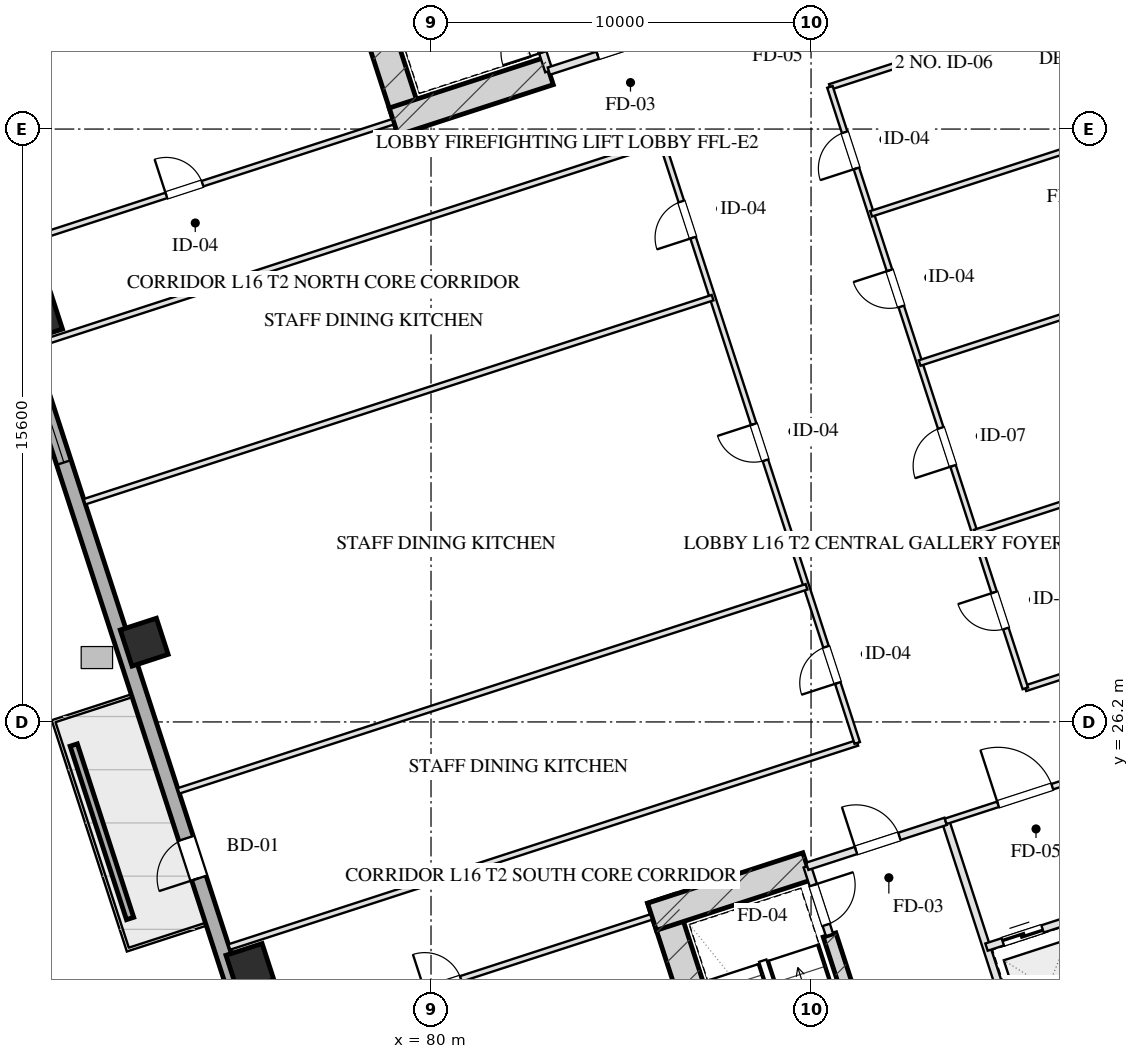
"""IFC4 building model, lengths in metres.
Left out: names, types, materials, properties, quantities, classifications, styles, units other than length and angle.
Written with IfcOpenShell. Run it as: python <this file> out.ifc"""

import sys

from ifc_helpers import new_model, si_unit, direction, frame, frame_2d, origin, origin_2d, place, context, subcontext, project, spatial, rectangle, hollow_rectangle, extrude, element, fill, save


model = new_model("IFC4")
c1 = context("Model", 3, precision=1e-05, world=origin(), true_north=direction((0.0, 1.0)))
c2 = subcontext(c1, "Body", "Model", "MODEL_VIEW")
j1 = project(units=[si_unit("LENGTHUNIT", "METRE"), si_unit("PLANEANGLEUNIT", "RADIAN")], contexts=[c1])
p1 = place(None, origin())
s1 = spatial("IfcSite", under=j1, at=p1, CompositionType="ELEMENT")
p2 = place(p1, origin())
s2 = spatial("IfcBuilding", under=s1, at=p2, CompositionType="ELEMENT")
p3 = place(p2, frame((0.0, 0.0, 67.85)))
s3 = spatial("IfcBuildingStorey", under=s2, at=p3, CompositionType="ELEMENT", Elevation=67.85)
p4 = place(p3, frame((86.055, 21.546, 0.0), z_axis=(0.0, 0.0, 1.0), x_axis=(0.309023585745, -0.951054374604, 0.0)))
e1 = element("IfcWall", 1, at=p4, inside=s3, PredefinedType="SHEAR", context=c2, shape_type="SweptSolid", body=[
    extrude(rectangle(XDim=9.63, YDim=0.75, at=frame_2d((4.815, 0.0))), origin(), (0.0, 0.0, 1.0), 3.45),
])
p5 = place(p3, frame((90.486, 20.594, 0.0), z_axis=(0.0, 0.0, 1.0), x_axis=(0.309020428229, -0.951055400562, 0.0)))
e2 = element("IfcWall", 2, at=p5, inside=s3, PredefinedType="SHEAR", context=c2, shape_type="SweptSolid", body=[
    extrude(rectangle(XDim=6.98, YDim=0.35, at=frame_2d((3.49, 0.0))), origin(), (0.0, 0.0, 1.0), 3.45),
])
p6 = place(p3, frame((85.814, 21.074, 0.0), z_axis=(0.0, 0.0, 1.0), x_axis=(0.95106580992, 0.308988390074, 0.0)))
e3 = element("IfcWall", 3, at=p6, inside=s3, PredefinedType="SHEAR", context=c2, shape_type="SweptSolid", body=[
    extrude(rectangle(XDim=4.295, YDim=0.75, at=frame_2d((2.147, 0.0))), origin(), (0.0, 0.0, 1.0), 3.45),
])
p7 = place(p3, frame((79.489, 41.756, 0.0), z_axis=(0.0, 0.0, 1.0), x_axis=(-0.309016134813, 0.951056795583, 0.0)))
e4 = element("IfcWall", 4, at=p7, inside=s3, PredefinedType="SHEAR", context=c2, shape_type="SweptSolid", body=[
    extrude(rectangle(XDim=9.63, YDim=0.75, at=frame_2d((4.815, 0.0))), origin(), (0.0, 0.0, 1.0), 3.45),
])
p8 = place(p3, frame((79.016, 41.997, 0.0), z_axis=(0.0, 0.0, 1.0), x_axis=(0.95106038264, 0.309005094736, 0.0)))
e5 = element("IfcWall", 5, at=p8, inside=s3, PredefinedType="SHEAR", context=c2, shape_type="SweptSolid", body=[
    extrude(rectangle(XDim=4.295, YDim=0.75, at=frame_2d((2.147, 0.0))), origin(), (0.0, 0.0, 1.0), 3.45),
])
for number, where, z_axis, x_axis in (
    (6, (75.234, 19.739, 0.0), (0.0, 0.0, 1.0), (0.951, 0.309, 0.0)),
    (7, (72.453, 28.299, 0.0), (0.0, 0.0, 1.0), (0.951, 0.309, 0.0)),
    (8, (69.672, 36.858, 0.0), (0.0, 0.0, 1.0), (0.951, 0.309, 0.0)),
):
    element("IfcColumn", number, at=place(p3, frame(where, z_axis=z_axis, x_axis=x_axis)), inside=s3, PredefinedType="COLUMN", context=c2, shape_type="SweptSolid", body=[
        extrude(hollow_rectangle(XDim=1.0, YDim=1.0, WallThickness=0.036, at=origin_2d()), origin(), (0.0, 0.0, 1.0), 3.451),
    ])
p9 = place(p3, frame((79.655, 4.352, 0.0), z_axis=(0.0, 0.0, 1.0), x_axis=(-0.309014526607, 0.951057318118, 0.0)))
e9 = element("IfcWall", 9, at=p9, inside=s3, PredefinedType="SOLIDWALL", context=c2, shape_type="SweptSolid", body=[
    extrude(rectangle(XDim=50.0, YDim=0.4, at=frame_2d((25.0, 0.0))), origin(), (0.0, 0.0, 1.0), 2.61),
])
p10 = place(p9, frame((30.15, 0.0, 0.75)))
e10 = element("IfcOpeningElement", 10, at=p10, cuts=e9, PredefinedType="OPENING", context=c2, shape_type="SweptSolid", body=[
    extrude(rectangle(XDim=2.5, YDim=1.46, at=frame_2d((1.25, 0.73))), frame((0.0, 0.21, 0.0), z_axis=(0.0, -1.0, 0.0), x_axis=(1.0, 0.0, 0.0)), (0.0, 0.0, 1.0), 0.42),
])
p11 = place(p9, frame((18.65, 0.0, 0.0)))
e11 = element("IfcOpeningElement", 11, at=p11, cuts=e9, PredefinedType="OPENING", context=c2, shape_type="SweptSolid", body=[
    extrude(rectangle(XDim=1.1, YDim=2.15, at=frame_2d((0.55, 1.075))), frame((0.0, 0.21, 0.0), z_axis=(0.0, -1.0, 0.0), x_axis=(1.0, 0.0, 0.0)), (0.0, 0.0, 1.0), 0.42),
])
p12 = place(p3, frame((72.082, 21.028, 0.0), z_axis=(0.0, 0.0, 1.0), x_axis=(-0.30900096172, 0.951061725471, 0.0)))
e12 = element("IfcWall", 12, at=p12, inside=s3, PredefinedType="PARAPET", context=c2, shape_type="SweptSolid", body=[
    extrude(rectangle(XDim=4.8, YDim=0.2, at=frame_2d((2.4, 0.0))), origin(), (0.0, 0.0, 1.0), 0.75),
])
p13 = place(p3, frame((89.899, 22.401, 0.0), z_axis=(0.0, 0.0, 1.0), x_axis=(0.308932062672, -0.951084108086, 0.0)))
e13 = element("IfcWall", 13, at=p13, inside=s3, PredefinedType="PARTITIONING", context=c2, shape_type="SweptSolid", body=[
    extrude(rectangle(XDim=1.9, YDim=0.2, at=frame_2d((0.95, 0.0))), origin(), (0.0, 0.0, 1.0), 3.175),
])
p14 = place(p13, frame((0.52, 0.0, 0.0)))
e14 = element("IfcOpeningElement", 14, at=p14, cuts=e13, PredefinedType="OPENING", context=c2, shape_type="SweptSolid", body=[
    extrude(rectangle(XDim=1.1, YDim=2.05, at=frame_2d((0.55, 1.025))), frame((0.0, 0.11, 0.0), z_axis=(0.0, -1.0, 0.0), x_axis=(1.0, 0.0, 0.0)), (0.0, 0.0, 1.0), 0.22),
])
p15 = place(p3, frame((93.542, 23.585, 0.0), z_axis=(0.0, 0.0, 1.0), x_axis=(0.309042196757, -0.951048327176, 0.0)))
e15 = element("IfcWall", 15, at=p15, inside=s3, PredefinedType="PARTITIONING", context=c2, shape_type="SweptSolid", body=[
    extrude(rectangle(XDim=8.43, YDim=0.2, at=frame_2d((4.215, 0.0))), origin(), (0.0, 0.0, 1.0), 3.175),
])
p16 = place(p3, frame((89.899, 22.401, 0.0), z_axis=(0.0, 0.0, 1.0), x_axis=(0.951046716504, 0.309047153403, 0.0)))
e16 = element("IfcWall", 16, at=p16, inside=s3, PredefinedType="PARTITIONING", context=c2, shape_type="SweptSolid", body=[
    extrude(rectangle(XDim=3.83, YDim=0.2, at=frame_2d((1.915, 0.0))), origin(), (0.0, 0.0, 1.0), 3.175),
])
p17 = place(p16, frame((1.35, 0.0, 0.0)))
e17 = element("IfcOpeningElement", 17, at=p17, cuts=e16, PredefinedType="OPENING", context=c2, shape_type="SweptSolid", body=[
    extrude(rectangle(XDim=1.2, YDim=2.05, at=frame_2d((0.6, 1.025))), frame((0.0, 0.11, 0.0), z_axis=(0.0, -1.0, 0.0), x_axis=(1.0, 0.0, 0.0)), (0.0, 0.0, 1.0), 0.22),
])
p18 = place(p3, frame((93.542, 23.585, 0.0), z_axis=(0.0, 0.0, 1.0), x_axis=(0.951063829732, 0.308994485023, 0.0)))
e18 = element("IfcWall", 18, at=p18, inside=s3, PredefinedType="PARTITIONING", context=c2, shape_type="SweptSolid", body=[
    extrude(rectangle(XDim=4.4, YDim=0.15, at=frame_2d((2.2, 0.0))), origin(), (0.0, 0.0, 1.0), 3.175),
])
p19 = place(p18, frame((1.45, 0.0, 0.0)))
e19 = element("IfcOpeningElement", 19, at=p19, cuts=e18, PredefinedType="OPENING", context=c2, shape_type="SweptSolid", body=[
    extrude(rectangle(XDim=1.5, YDim=2.05, at=frame_2d((0.75, 1.025))), frame((0.0, 0.085, 0.0), z_axis=(0.0, -1.0, 0.0), x_axis=(1.0, 0.0, 0.0)), (0.0, 0.0, 1.0), 0.17),
])
p20 = place(p3, frame((94.617, 20.275, 0.0), z_axis=(0.0, 0.0, 1.0), x_axis=(0.951058531764, 0.30901079133, 0.0)))
e20 = element("IfcWall", 20, at=p20, inside=s3, PredefinedType="PARTITIONING", context=c2, shape_type="SweptSolid", body=[
    extrude(rectangle(XDim=4.4, YDim=0.2, at=frame_2d((2.2, 0.0))), origin(), (0.0, 0.0, 1.0), 3.175),
])
p21 = place(p20, frame((0.45, 0.0, 0.0)))
e21 = element("IfcOpeningElement", 21, at=p21, cuts=e20, PredefinedType="OPENING", context=c2, shape_type="SweptSolid", body=[
    extrude(rectangle(XDim=1.1, YDim=2.05, at=frame_2d((0.55, 1.025))), frame((0.0, 0.11, 0.0), z_axis=(0.0, -1.0, 0.0), x_axis=(1.0, 0.0, 0.0)), (0.0, 0.0, 1.0), 0.22),
])
p22 = place(p20, frame((2.55, 0.0, 0.0)))
e22 = element("IfcOpeningElement", 22, at=p22, cuts=e20, PredefinedType="OPENING", context=c2, shape_type="SweptSolid", body=[
    extrude(rectangle(XDim=1.1, YDim=2.05, at=frame_2d((0.55, 1.025))), frame((0.0, 0.11, 0.0), z_axis=(0.0, -1.0, 0.0), x_axis=(1.0, 0.0, 0.0)), (0.0, 0.0, 1.0), 0.22),
])
p23 = place(p3, frame((83.101, 43.324, 0.0), z_axis=(0.0, 0.0, 1.0), x_axis=(-0.309048298632, 0.951046344356, 0.0)))
e23 = element("IfcWall", 23, at=p23, inside=s3, PredefinedType="PARTITIONING", context=c2, shape_type="SweptSolid", body=[
    extrude(rectangle(XDim=1.9, YDim=0.2, at=frame_2d((0.95, 0.0))), origin(), (0.0, 0.0, 1.0), 3.175),
])
p24 = place(p23, frame((0.52, 0.0, 0.0)))
e24 = element("IfcOpeningElement", 24, at=p24, cuts=e23, PredefinedType="OPENING", context=c2, shape_type="SweptSolid", body=[
    extrude(rectangle(XDim=1.1, YDim=2.05, at=frame_2d((0.55, 1.025))), frame((0.0, 0.11, 0.0), z_axis=(0.0, -1.0, 0.0), x_axis=(1.0, 0.0, 0.0)), (0.0, 0.0, 1.0), 0.22),
])
p25 = place(p3, frame((83.101, 43.324, 0.0), z_axis=(0.0, 0.0, 1.0), x_axis=(0.951052804469, 0.309028417967, 0.0)))
e25 = element("IfcWall", 25, at=p25, inside=s3, PredefinedType="PARTITIONING", context=c2, shape_type="SweptSolid", body=[
    extrude(rectangle(XDim=3.83, YDim=0.2, at=frame_2d((1.915, 0.0))), origin(), (0.0, 0.0, 1.0), 3.175),
])
p26 = place(p25, frame((1.35, 0.0, 0.0)))
e26 = element("IfcOpeningElement", 26, at=p26, cuts=e25, PredefinedType="OPENING", context=c2, shape_type="SweptSolid", body=[
    extrude(rectangle(XDim=1.2, YDim=2.05, at=frame_2d((0.6, 1.025))), frame((0.0, 0.11, 0.0), z_axis=(0.0, -1.0, 0.0), x_axis=(1.0, 0.0, 0.0)), (0.0, 0.0, 1.0), 0.22),
])
p27 = place(p3, frame((75.519, 17.729, 0.0), z_axis=(0.0, 0.0, 1.0), x_axis=(0.951056658866, 0.309016555588, 0.0)))
e27 = element("IfcWall", 27, at=p27, inside=s3, PredefinedType="PARTITIONING", context=c2, shape_type="SweptSolid", body=[
    extrude(rectangle(XDim=10.8, YDim=0.15, at=frame_2d((5.4, 0.0))), origin(), (0.0, 0.0, 1.0), 3.175),
])
p28 = place(p27, frame((4.536, 0.0, 0.0)))
e28 = element("IfcOpeningElement", 28, at=p28, cuts=e27, PredefinedType="OPENING", context=c2, shape_type="SweptSolid", body=[
    extrude(rectangle(XDim=1.0, YDim=2.05, at=frame_2d((0.5, 1.025))), frame((0.0, 0.085, 0.0), z_axis=(0.0, -1.0, 0.0), x_axis=(1.0, 0.0, 0.0)), (0.0, 0.0, 1.0), 0.17),
])
p29 = place(p3, frame((68.721, 38.652, 0.0), z_axis=(0.0, 0.0, 1.0), x_axis=(0.951056658866, 0.309016555588, 0.0)))
e29 = element("IfcWall", 29, at=p29, inside=s3, PredefinedType="PARTITIONING", context=c2, shape_type="SweptSolid", body=[
    extrude(rectangle(XDim=10.8, YDim=0.15, at=frame_2d((5.4, 0.0))), origin(), (0.0, 0.0, 1.0), 3.175),
])
p30 = place(p29, frame((4.536, 0.0, 0.0)))
e30 = element("IfcOpeningElement", 30, at=p30, cuts=e29, PredefinedType="OPENING", context=c2, shape_type="SweptSolid", body=[
    extrude(rectangle(XDim=1.0, YDim=2.05, at=frame_2d((0.5, 1.025))), frame((0.0, 0.085, 0.0), z_axis=(0.0, -1.0, 0.0), x_axis=(1.0, 0.0, 0.0)), (0.0, 0.0, 1.0), 0.17),
])
p31 = place(p3, frame((74.691, 20.278, 0.0), z_axis=(0.0, 0.0, 1.0), x_axis=(0.951053169828, 0.309027293551, 0.0)))
e31 = element("IfcWall", 31, at=p31, inside=s3, PredefinedType="PARTITIONING", context=c2, shape_type="SweptSolid", body=[
    extrude(rectangle(XDim=17.375, YDim=0.15, at=frame_2d((8.688, 0.0))), origin(), (0.0, 0.0, 1.0), 3.175),
])
p32 = place(p3, frame((95.638, 27.084, 0.0), z_axis=(0.0, 0.0, 1.0), x_axis=(0.951055837847, 0.309019082414, 0.0)))
e32 = element("IfcWall", 32, at=p32, inside=s3, PredefinedType="PARTITIONING", context=c2, shape_type="SweptSolid", body=[
    extrude(rectangle(XDim=15.575, YDim=0.15, at=frame_2d((7.788, 0.0))), origin(), (0.0, 0.0, 1.0), 3.175),
])
p33 = place(p3, frame((69.549, 36.103, 0.0), z_axis=(0.0, 0.0, 1.0), x_axis=(0.951057299418, 0.309014584159, 0.0)))
e33 = element("IfcWall", 33, at=p33, inside=s3, PredefinedType="PARTITIONING", context=c2, shape_type="SweptSolid", body=[
    extrude(rectangle(XDim=17.375, YDim=0.15, at=frame_2d((8.688, 0.0))), origin(), (0.0, 0.0, 1.0), 3.175),
])
p34 = place(p3, frame((90.496, 42.909, 0.0), z_axis=(0.0, 0.0, 1.0), x_axis=(0.951055837847, 0.309019082414, 0.0)))
e34 = element("IfcWall", 34, at=p34, inside=s3, PredefinedType="PARTITIONING", context=c2, shape_type="SweptSolid", body=[
    extrude(rectangle(XDim=15.575, YDim=0.15, at=frame_2d((7.788, 0.0))), origin(), (0.0, 0.0, 1.0), 3.175),
])
p35 = place(p3, frame((91.216, 25.647, 0.0), z_axis=(0.0, 0.0, 1.0), x_axis=(-0.309022042254, 0.951054876125, 0.0)))
e35 = element("IfcWall", 35, at=p35, inside=s3, PredefinedType="PARTITIONING", context=c2, shape_type="SweptSolid", body=[
    extrude(rectangle(XDim=16.64, YDim=0.15, at=frame_2d((8.32, 0.0))), origin(), (0.0, 0.0, 1.0), 3.175),
])
p36 = place(p35, frame((1.66, 0.0, 0.0)))
e36 = element("IfcOpeningElement", 36, at=p36, cuts=e35, PredefinedType="OPENING", context=c2, shape_type="SweptSolid", body=[
    extrude(rectangle(XDim=1.0, YDim=2.05, at=frame_2d((0.5, 1.025))), frame((0.0, 0.085, 0.0), z_axis=(0.0, -1.0, 0.0), x_axis=(1.0, 0.0, 0.0)), (0.0, 0.0, 1.0), 0.17),
])
p37 = place(p35, frame((7.82, 0.0, 0.0)))
e37 = element("IfcOpeningElement", 37, at=p37, cuts=e35, PredefinedType="OPENING", context=c2, shape_type="SweptSolid", body=[
    extrude(rectangle(XDim=1.0, YDim=2.05, at=frame_2d((0.5, 1.025))), frame((0.0, 0.085, 0.0), z_axis=(0.0, -1.0, 0.0), x_axis=(1.0, 0.0, 0.0)), (0.0, 0.0, 1.0), 0.17),
])
p38 = place(p35, frame((13.98, 0.0, 0.0)))
e38 = element("IfcOpeningElement", 38, at=p38, cuts=e35, PredefinedType="OPENING", context=c2, shape_type="SweptSolid", body=[
    extrude(rectangle(XDim=1.0, YDim=2.05, at=frame_2d((0.5, 1.025))), frame((0.0, 0.085, 0.0), z_axis=(0.0, -1.0, 0.0), x_axis=(1.0, 0.0, 0.0)), (0.0, 0.0, 1.0), 0.17),
])
p39 = place(p3, frame((95.638, 27.084, 0.0), z_axis=(0.0, 0.0, 1.0), x_axis=(-0.30901773025, 0.951056277195, 0.0)))
e39 = element("IfcWall", 39, at=p39, inside=s3, PredefinedType="PARTITIONING", context=c2, shape_type="SweptSolid", body=[
    extrude(rectangle(XDim=16.64, YDim=0.15, at=frame_2d((8.32, 0.0))), origin(), (0.0, 0.0, 1.0), 3.175),
])
p40 = place(p39, frame((1.655, 0.0, 0.0)))
e40 = element("IfcOpeningElement", 40, at=p40, cuts=e39, PredefinedType="OPENING", context=c2, shape_type="SweptSolid", body=[
    extrude(rectangle(XDim=1.0, YDim=2.05, at=frame_2d((0.5, 1.025))), frame((0.0, 0.085, 0.0), z_axis=(0.0, -1.0, 0.0), x_axis=(1.0, 0.0, 0.0)), (0.0, 0.0, 1.0), 0.17),
])
p41 = place(p39, frame((6.155, 0.0, 0.0)))
e41 = element("IfcOpeningElement", 41, at=p41, cuts=e39, PredefinedType="OPENING", context=c2, shape_type="SweptSolid", body=[
    extrude(rectangle(XDim=1.05, YDim=2.05, at=frame_2d((0.525, 1.025))), frame((0.0, 0.085, 0.0), z_axis=(0.0, -1.0, 0.0), x_axis=(1.0, 0.0, 0.0)), (0.0, 0.0, 1.0), 0.17),
])
p42 = place(p39, frame((10.565, 0.0, 0.0)))
e42 = element("IfcOpeningElement", 42, at=p42, cuts=e39, PredefinedType="OPENING", context=c2, shape_type="SweptSolid", body=[
    extrude(rectangle(XDim=1.0, YDim=2.05, at=frame_2d((0.5, 1.025))), frame((0.0, 0.085, 0.0), z_axis=(0.0, -1.0, 0.0), x_axis=(1.0, 0.0, 0.0)), (0.0, 0.0, 1.0), 0.17),
])
p43 = place(p39, frame((14.385, 0.0, 0.0)))
e43 = element("IfcOpeningElement", 43, at=p43, cuts=e39, PredefinedType="OPENING", context=c2, shape_type="SweptSolid", body=[
    extrude(rectangle(XDim=1.0, YDim=2.05, at=frame_2d((0.5, 1.025))), frame((0.0, 0.085, 0.0), z_axis=(0.0, -1.0, 0.0), x_axis=(1.0, 0.0, 0.0)), (0.0, 0.0, 1.0), 0.17),
])
for number, where, z_axis, x_axis in (
    (44, (73.356, 24.386, 0.0), (0.0, 0.0, 1.0), (0.951, 0.309, 0.0)),
    (45, (70.884, 31.995, 0.0), (0.0, 0.0, 1.0), (0.951, 0.309, 0.0)),
):
    element("IfcWall", number, at=place(p3, frame(where, z_axis=z_axis, x_axis=x_axis)), inside=s3, PredefinedType="PARTITIONING", context=c2, shape_type="SweptSolid", body=[
        extrude(rectangle(XDim=17.375, YDim=0.15, at=frame_2d((8.688, 0.0))), origin(), (0.0, 0.0, 1.0), 3.175),
    ])
for number, where, z_axis, x_axis in (
    (46, (94.306, 31.183, 0.0), (0.0, 0.0, 1.0), (0.951, 0.309, 0.0)),
    (47, (92.857, 35.643, 0.0), (0.0, 0.0, 1.0), (0.951, 0.309, 0.0)),
    (48, (91.581, 39.57, 0.0), (0.0, 0.0, 1.0), (0.951, 0.309, 0.0)),
):
    element("IfcWall", number, at=place(p3, frame(where, z_axis=z_axis, x_axis=x_axis)), inside=s3, PredefinedType="PARTITIONING", context=c2, shape_type="SweptSolid", body=[
        extrude(rectangle(XDim=15.575, YDim=0.15, at=frame_2d((7.788, 0.0))), origin(), (0.0, 0.0, 1.0), 3.175),
    ])
p44 = place(p10, origin())
e49 = element("IfcWindow", 49, at=p44, inside=s3, PartitioningType="TRIPLE_PANEL_VERTICAL", PredefinedType="WINDOW", context=c2, shape_type="SweptSolid", body=[
    extrude(rectangle(XDim=2.5, YDim=1.46, at=frame_2d((1.25, 0.73))), frame((0.0, 0.03, 0.0), z_axis=(0.0, -1.0, 0.0), x_axis=(1.0, 0.0, 0.0)), (0.0, 0.0, 1.0), 0.06),
])
fill(e10, e49)
p45 = place(p11, origin())
e50 = element("IfcDoor", 50, at=p45, inside=s3, OperationType="SINGLE_SWING_LEFT", PredefinedType="DOOR", context=c2, shape_type="SweptSolid", body=[
    extrude(rectangle(XDim=1.1, YDim=2.15, at=frame_2d((0.55, 1.075))), frame((0.0, 0.025, 0.0), z_axis=(0.0, -1.0, 0.0), x_axis=(1.0, 0.0, 0.0)), (0.0, 0.0, 1.0), 0.05),
])
fill(e11, e50)
p46 = place(p14, origin())
e51 = element("IfcDoor", 51, at=p46, inside=s3, OperationType="SINGLE_SWING_LEFT", PredefinedType="DOOR", context=c2, shape_type="SweptSolid", body=[
    extrude(rectangle(XDim=1.1, YDim=2.05, at=frame_2d((0.55, 1.025))), frame((0.0, 0.025, 0.0), z_axis=(0.0, -1.0, 0.0), x_axis=(1.0, 0.0, 0.0)), (0.0, 0.0, 1.0), 0.05),
])
fill(e14, e51)
p47 = place(p17, origin())
e52 = element("IfcDoor", 52, at=p47, inside=s3, OperationType="SINGLE_SWING_LEFT", PredefinedType="DOOR", context=c2, shape_type="SweptSolid", body=[
    extrude(rectangle(XDim=1.2, YDim=2.05, at=frame_2d((0.6, 1.025))), frame((0.0, 0.025, 0.0), z_axis=(0.0, -1.0, 0.0), x_axis=(1.0, 0.0, 0.0)), (0.0, 0.0, 1.0), 0.05),
])
fill(e17, e52)
p48 = place(p19, origin())
e53 = element("IfcDoor", 53, at=p48, inside=s3, OperationType="SINGLE_SWING_LEFT", PredefinedType="DOOR", context=c2, shape_type="SweptSolid", body=[
    extrude(rectangle(XDim=1.5, YDim=2.05, at=frame_2d((0.75, 1.025))), frame((0.0, 0.025, 0.0), z_axis=(0.0, -1.0, 0.0), x_axis=(1.0, 0.0, 0.0)), (0.0, 0.0, 1.0), 0.05),
])
fill(e19, e53)
p49 = place(p21, origin())
e54 = element("IfcDoor", 54, at=p49, inside=s3, OperationType="DOUBLE_DOOR_SLIDING", PredefinedType="DOOR", context=c2, shape_type="SweptSolid", body=[
    extrude(rectangle(XDim=1.1, YDim=2.05, at=frame_2d((0.55, 1.025))), frame((0.0, 0.025, 0.0), z_axis=(0.0, -1.0, 0.0), x_axis=(1.0, 0.0, 0.0)), (0.0, 0.0, 1.0), 0.05),
])
fill(e21, e54)
p50 = place(p26, origin())
e55 = element("IfcDoor", 55, at=p50, inside=s3, OperationType="SINGLE_SWING_LEFT", PredefinedType="DOOR", context=c2, shape_type="SweptSolid", body=[
    extrude(rectangle(XDim=1.2, YDim=2.05, at=frame_2d((0.6, 1.025))), frame((0.0, 0.025, 0.0), z_axis=(0.0, -1.0, 0.0), x_axis=(1.0, 0.0, 0.0)), (0.0, 0.0, 1.0), 0.05),
])
fill(e26, e55)
p51 = place(p28, origin())
e56 = element("IfcDoor", 56, at=p51, inside=s3, OperationType="SINGLE_SWING_LEFT", PredefinedType="DOOR", context=c2, shape_type="SweptSolid", body=[
    extrude(rectangle(XDim=1.0, YDim=2.05, at=frame_2d((0.5, 1.025))), frame((0.0, 0.025, 0.0), z_axis=(0.0, -1.0, 0.0), x_axis=(1.0, 0.0, 0.0)), (0.0, 0.0, 1.0), 0.05),
])
fill(e28, e56)
p52 = place(p30, origin())
e57 = element("IfcDoor", 57, at=p52, inside=s3, OperationType="SINGLE_SWING_LEFT", PredefinedType="DOOR", context=c2, shape_type="SweptSolid", body=[
    extrude(rectangle(XDim=1.0, YDim=2.05, at=frame_2d((0.5, 1.025))), frame((0.0, 0.025, 0.0), z_axis=(0.0, -1.0, 0.0), x_axis=(1.0, 0.0, 0.0)), (0.0, 0.0, 1.0), 0.05),
])
fill(e30, e57)
p53 = place(p36, origin())
e58 = element("IfcDoor", 58, at=p53, inside=s3, OperationType="SINGLE_SWING_LEFT", PredefinedType="DOOR", context=c2, shape_type="SweptSolid", body=[
    extrude(rectangle(XDim=1.0, YDim=2.05, at=frame_2d((0.5, 1.025))), frame((0.0, 0.025, 0.0), z_axis=(0.0, -1.0, 0.0), x_axis=(1.0, 0.0, 0.0)), (0.0, 0.0, 1.0), 0.05),
])
fill(e36, e58)
p54 = place(p37, origin())
e59 = element("IfcDoor", 59, at=p54, inside=s3, OperationType="SINGLE_SWING_RIGHT", PredefinedType="DOOR", context=c2, shape_type="SweptSolid", body=[
    extrude(rectangle(XDim=1.0, YDim=2.05, at=frame_2d((0.5, 1.025))), frame((0.0, 0.025, 0.0), z_axis=(0.0, -1.0, 0.0), x_axis=(1.0, 0.0, 0.0)), (0.0, 0.0, 1.0), 0.05),
])
fill(e37, e59)
p55 = place(p38, origin())
e60 = element("IfcDoor", 60, at=p55, inside=s3, OperationType="SINGLE_SWING_LEFT", PredefinedType="DOOR", context=c2, shape_type="SweptSolid", body=[
    extrude(rectangle(XDim=1.0, YDim=2.05, at=frame_2d((0.5, 1.025))), frame((0.0, 0.025, 0.0), z_axis=(0.0, -1.0, 0.0), x_axis=(1.0, 0.0, 0.0)), (0.0, 0.0, 1.0), 0.05),
])
fill(e38, e60)
p56 = place(p40, origin())
e61 = element("IfcDoor", 61, at=p56, inside=s3, OperationType="SINGLE_SWING_RIGHT", PredefinedType="DOOR", context=c2, shape_type="SweptSolid", body=[
    extrude(rectangle(XDim=1.0, YDim=2.05, at=frame_2d((0.5, 1.025))), frame((0.0, 0.025, 0.0), z_axis=(0.0, -1.0, 0.0), x_axis=(1.0, 0.0, 0.0)), (0.0, 0.0, 1.0), 0.05),
])
fill(e40, e61)
p57 = place(p41, origin())
e62 = element("IfcDoor", 62, at=p57, inside=s3, OperationType="SINGLE_SWING_LEFT", PredefinedType="DOOR", context=c2, shape_type="SweptSolid", body=[
    extrude(rectangle(XDim=1.05, YDim=2.05, at=frame_2d((0.525, 1.025))), frame((0.0, 0.025, 0.0), z_axis=(0.0, -1.0, 0.0), x_axis=(1.0, 0.0, 0.0)), (0.0, 0.0, 1.0), 0.05),
])
fill(e41, e62)
p58 = place(p42, origin())
e63 = element("IfcDoor", 63, at=p58, inside=s3, OperationType="SINGLE_SWING_RIGHT", PredefinedType="DOOR", context=c2, shape_type="SweptSolid", body=[
    extrude(rectangle(XDim=1.0, YDim=2.05, at=frame_2d((0.5, 1.025))), frame((0.0, 0.025, 0.0), z_axis=(0.0, -1.0, 0.0), x_axis=(1.0, 0.0, 0.0)), (0.0, 0.0, 1.0), 0.05),
])
fill(e42, e63)
p59 = place(p43, origin())
e64 = element("IfcDoor", 64, at=p59, inside=s3, OperationType="SINGLE_SWING_LEFT", PredefinedType="DOOR", context=c2, shape_type="SweptSolid", body=[
    extrude(rectangle(XDim=1.0, YDim=2.05, at=frame_2d((0.5, 1.025))), frame((0.0, 0.025, 0.0), z_axis=(0.0, -1.0, 0.0), x_axis=(1.0, 0.0, 0.0)), (0.0, 0.0, 1.0), 0.05),
])
fill(e43, e64)
save(model, sys.argv[1])
